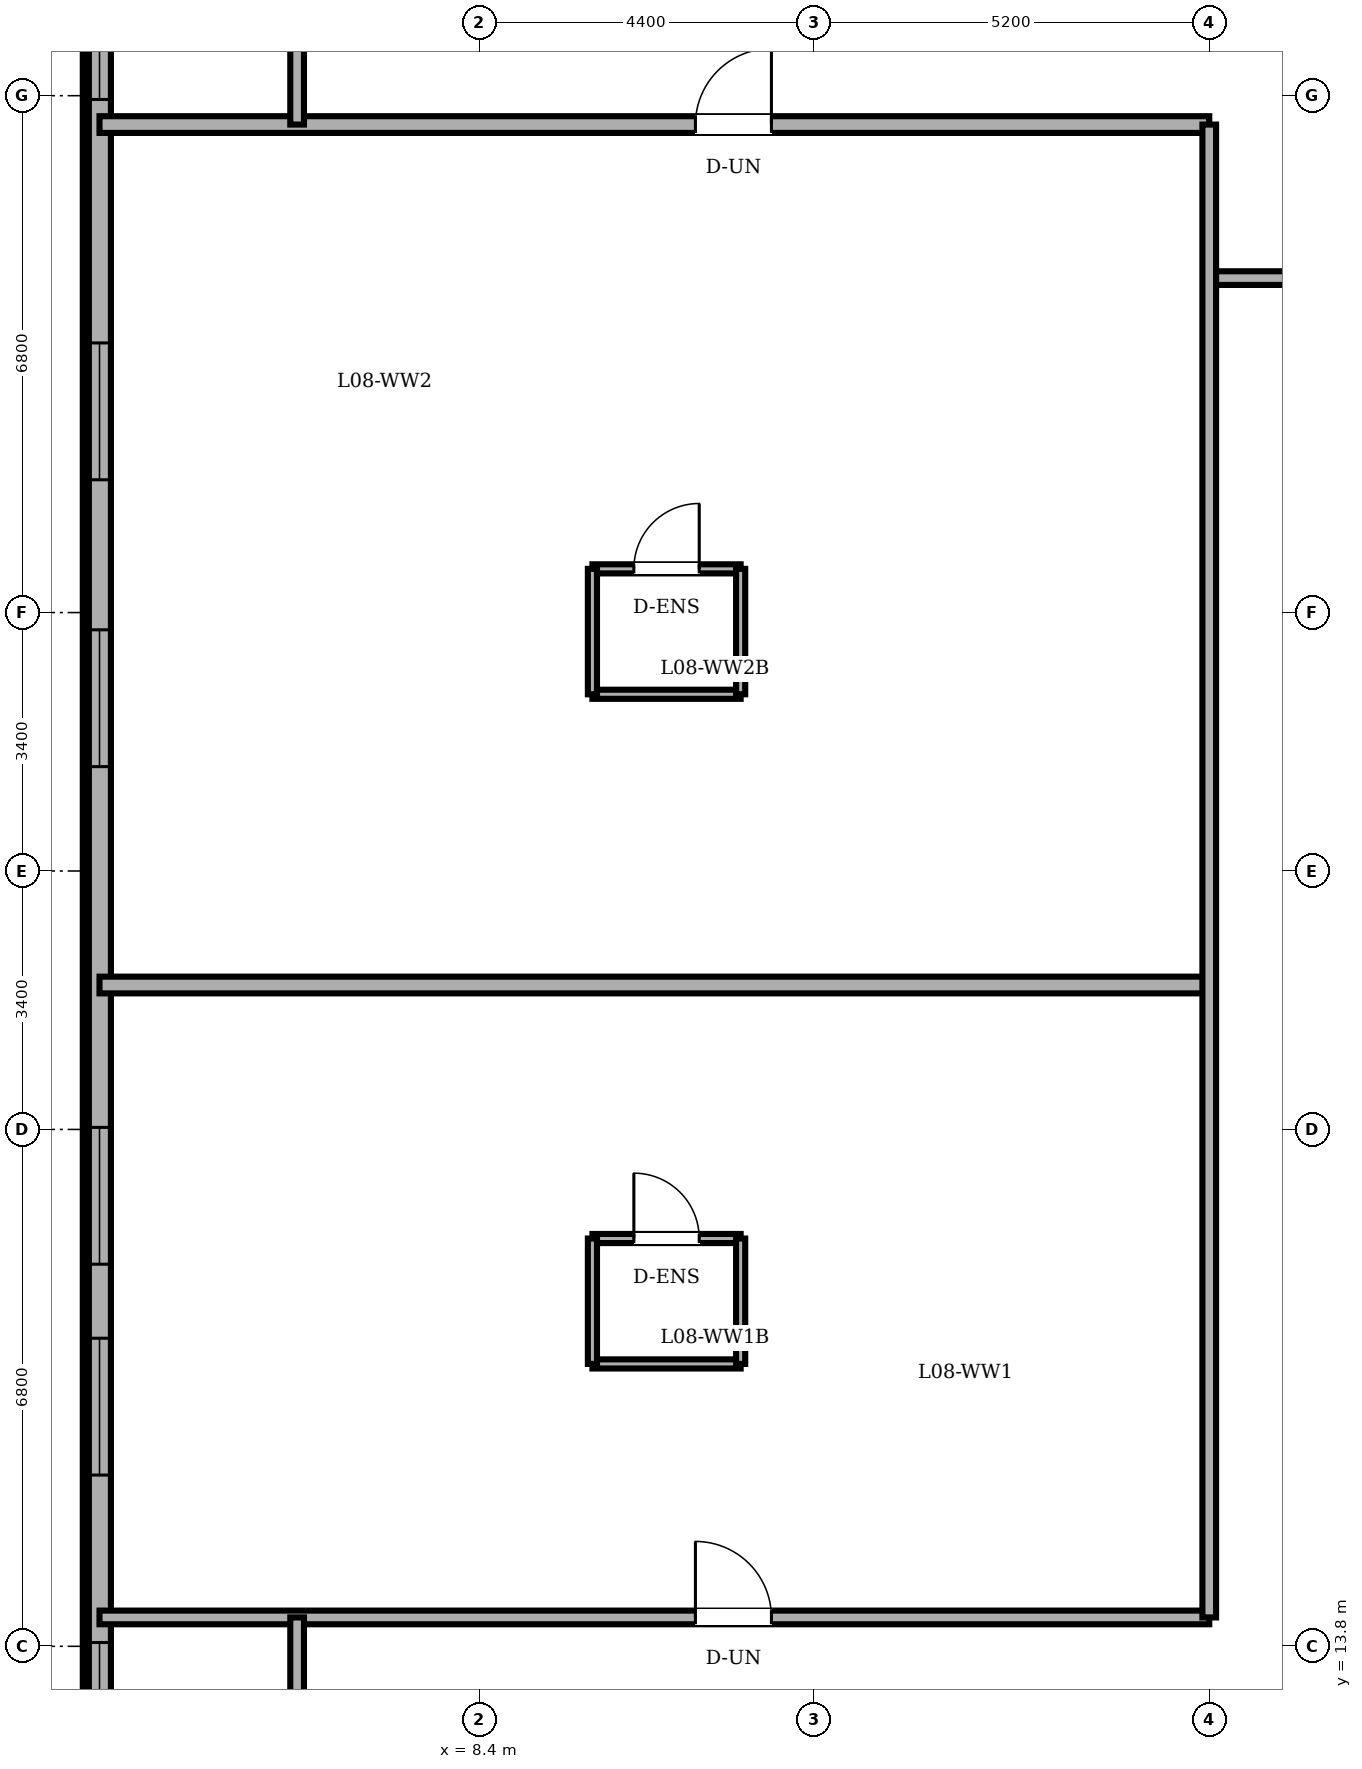
"""IFC4 building model, lengths in metres.
Left out: names, types, materials, properties, quantities, classifications, styles, units other than length and angle.
Written with IfcOpenShell. Run it as: python <this file> out.ifc"""

import sys

from ifc_helpers import new_model, si_unit, direction, frame, frame_2d, origin, place, context, subcontext, project, spatial, rectangle, extrude, element, fill, save


model = new_model("IFC4")
c1 = context("Model", 3, precision=1e-05, world=origin(), true_north=direction((0.0, 1.0)))
c2 = subcontext(c1, "Body", "Model", "MODEL_VIEW")
j1 = project(units=[si_unit("LENGTHUNIT", "METRE"), si_unit("PLANEANGLEUNIT", "RADIAN")], contexts=[c1])
p1 = place(None, origin())
s1 = spatial("IfcSite", under=j1, at=p1, CompositionType="ELEMENT")
p2 = place(p1, origin())
s2 = spatial("IfcBuilding", under=s1, at=p2, CompositionType="ELEMENT")
p3 = place(p2, frame((0.0, 0.0, 32.4)))
s3 = spatial("IfcBuildingStorey", under=s2, at=p3, CompositionType="ELEMENT", Elevation=32.4)
p4 = place(p3, frame((3.4, 40.2, 0.0), z_axis=(0.0, 0.0, 1.0), x_axis=(0.0, -1.0, 0.0)))
e1 = element("IfcWall", 1, at=p4, inside=s3, PredefinedType="SOLIDWALL", context=c2, shape_type="SweptSolid", body=[
    extrude(rectangle(XDim=32.4, YDim=0.3, at=frame_2d((16.2, 0.0))), origin(), (0.0, 0.0, 1.0), 3.4),
])
p5 = place(p4, frame((1.235, 0.0, 0.85)))
e2 = element("IfcOpeningElement", 2, at=p5, cuts=e1, PredefinedType="OPENING", context=c2, shape_type="SweptSolid", body=[
    extrude(rectangle(XDim=1.8, YDim=1.55, at=frame_2d((0.9, 0.775))), frame((0.0, 0.16, 0.0), z_axis=(0.0, -1.0, 0.0), x_axis=(1.0, 0.0, 0.0)), (0.0, 0.0, 1.0), 0.32),
])
p6 = place(p4, frame((4.25, 0.0, 0.85)))
e3 = element("IfcOpeningElement", 3, at=p6, cuts=e1, PredefinedType="OPENING", context=c2, shape_type="SweptSolid", body=[
    extrude(rectangle(XDim=1.8, YDim=1.55, at=frame_2d((0.9, 0.775))), frame((0.0, 0.16, 0.0), z_axis=(0.0, -1.0, 0.0), x_axis=(1.0, 0.0, 0.0)), (0.0, 0.0, 1.0), 0.32),
])
p7 = place(p4, frame((9.253, 0.0, 0.85)))
e4 = element("IfcOpeningElement", 4, at=p7, cuts=e1, PredefinedType="OPENING", context=c2, shape_type="SweptSolid", body=[
    extrude(rectangle(XDim=1.8, YDim=1.55, at=frame_2d((0.9, 0.775))), frame((0.0, 0.16, 0.0), z_axis=(0.0, -1.0, 0.0), x_axis=(1.0, 0.0, 0.0)), (0.0, 0.0, 1.0), 0.32),
])
p8 = place(p4, frame((13.027, 0.0, 0.85)))
e5 = element("IfcOpeningElement", 5, at=p8, cuts=e1, PredefinedType="OPENING", context=c2, shape_type="SweptSolid", body=[
    extrude(rectangle(XDim=1.8, YDim=1.55, at=frame_2d((0.9, 0.775))), frame((0.0, 0.16, 0.0), z_axis=(0.0, -1.0, 0.0), x_axis=(1.0, 0.0, 0.0)), (0.0, 0.0, 1.0), 0.32),
])
p9 = place(p4, frame((19.573, 0.0, 0.85)))
e6 = element("IfcOpeningElement", 6, at=p9, cuts=e1, PredefinedType="OPENING", context=c2, shape_type="SweptSolid", body=[
    extrude(rectangle(XDim=1.8, YDim=1.55, at=frame_2d((0.9, 0.775))), frame((0.0, 0.16, 0.0), z_axis=(0.0, -1.0, 0.0), x_axis=(1.0, 0.0, 0.0)), (0.0, 0.0, 1.0), 0.32),
])
p10 = place(p4, frame((22.347, 0.0, 0.85)))
e7 = element("IfcOpeningElement", 7, at=p10, cuts=e1, PredefinedType="OPENING", context=c2, shape_type="SweptSolid", body=[
    extrude(rectangle(XDim=1.8, YDim=1.55, at=frame_2d((0.9, 0.775))), frame((0.0, 0.16, 0.0), z_axis=(0.0, -1.0, 0.0), x_axis=(1.0, 0.0, 0.0)), (0.0, 0.0, 1.0), 0.32),
])
p11 = place(p4, frame((26.35, 0.0, 0.85)))
e8 = element("IfcOpeningElement", 8, at=p11, cuts=e1, PredefinedType="OPENING", context=c2, shape_type="SweptSolid", body=[
    extrude(rectangle(XDim=1.8, YDim=1.55, at=frame_2d((0.9, 0.775))), frame((0.0, 0.16, 0.0), z_axis=(0.0, -1.0, 0.0), x_axis=(1.0, 0.0, 0.0)), (0.0, 0.0, 1.0), 0.32),
])
p12 = place(p4, frame((29.365, 0.0, 0.85)))
e9 = element("IfcOpeningElement", 9, at=p12, cuts=e1, PredefinedType="OPENING", context=c2, shape_type="SweptSolid", body=[
    extrude(rectangle(XDim=1.8, YDim=1.55, at=frame_2d((0.9, 0.775))), frame((0.0, 0.16, 0.0), z_axis=(0.0, -1.0, 0.0), x_axis=(1.0, 0.0, 0.0)), (0.0, 0.0, 1.0), 0.32),
])
p13 = place(p3, frame((9.885, 19.165, 0.0), z_axis=(0.0, 0.0, 1.0), x_axis=(1.0, 0.0, 0.0)))
e10 = element("IfcWall", 10, at=p13, inside=s3, PredefinedType="PARTITIONING", context=c2, shape_type="SweptSolid", body=[
    extrude(rectangle(XDim=1.95, YDim=0.12, at=frame_2d((0.975, 0.0))), origin(), (0.0, 0.0, 1.0), 3.4),
])
p14 = place(p13, frame((0.545, 0.0, 0.0)))
e11 = element("IfcOpeningElement", 11, at=p14, cuts=e10, PredefinedType="OPENING", context=c2, shape_type="SweptSolid", body=[
    extrude(rectangle(XDim=0.86, YDim=2.1, at=frame_2d((0.43, 1.05))), frame((0.0, 0.07, 0.0), z_axis=(0.0, -1.0, 0.0), x_axis=(1.0, 0.0, 0.0)), (0.0, 0.0, 1.0), 0.14),
])
p15 = place(p3, frame((11.835, 17.515, 0.0), z_axis=(0.0, 0.0, 1.0), x_axis=(-1.0, 0.0, 0.0)))
e12 = element("IfcWall", 12, at=p15, inside=s3, PredefinedType="PARTITIONING", context=c2, shape_type="SweptSolid", body=[
    extrude(rectangle(XDim=1.95, YDim=0.12, at=frame_2d((0.975, 0.0))), origin(), (0.0, 0.0, 1.0), 3.4),
])
for number, where, z_axis, x_axis in (
    (13, (9.885, 19.165, 0.0), (0.0, 0.0, 1.0), (0.0, -1.0, 0.0)),
    (14, (11.835, 17.515, 0.0), (0.0, 0.0, 1.0), (0.0, 1.0, 0.0)),
):
    element("IfcWall", number, at=place(p3, frame(where, z_axis=z_axis, x_axis=x_axis)), inside=s3, PredefinedType="PARTITIONING", context=c2, shape_type="SweptSolid", body=[
        extrude(rectangle(XDim=1.65, YDim=0.12, at=frame_2d((0.825, 0.0))), origin(), (0.0, 0.0, 1.0), 3.4),
    ])
p16 = place(p3, frame((9.885, 27.975, 0.0), z_axis=(0.0, 0.0, 1.0), x_axis=(1.0, 0.0, 0.0)))
e15 = element("IfcWall", 15, at=p16, inside=s3, PredefinedType="PARTITIONING", context=c2, shape_type="SweptSolid", body=[
    extrude(rectangle(XDim=1.95, YDim=0.12, at=frame_2d((0.975, 0.0))), origin(), (0.0, 0.0, 1.0), 3.4),
])
p17 = place(p16, frame((0.545, 0.0, 0.0)))
e16 = element("IfcOpeningElement", 16, at=p17, cuts=e15, PredefinedType="OPENING", context=c2, shape_type="SweptSolid", body=[
    extrude(rectangle(XDim=0.86, YDim=2.1, at=frame_2d((0.43, 1.05))), frame((0.0, 0.07, 0.0), z_axis=(0.0, -1.0, 0.0), x_axis=(1.0, 0.0, 0.0)), (0.0, 0.0, 1.0), 0.14),
])
p18 = place(p3, frame((11.835, 26.325, 0.0), z_axis=(0.0, 0.0, 1.0), x_axis=(-1.0, 0.0, 0.0)))
e17 = element("IfcWall", 17, at=p18, inside=s3, PredefinedType="PARTITIONING", context=c2, shape_type="SweptSolid", body=[
    extrude(rectangle(XDim=1.95, YDim=0.12, at=frame_2d((0.975, 0.0))), origin(), (0.0, 0.0, 1.0), 3.4),
])
for number, where, z_axis, x_axis in (
    (18, (9.885, 27.975, 0.0), (0.0, 0.0, 1.0), (0.0, -1.0, 0.0)),
    (19, (11.835, 26.325, 0.0), (0.0, 0.0, 1.0), (0.0, 1.0, 0.0)),
):
    element("IfcWall", number, at=place(p3, frame(where, z_axis=z_axis, x_axis=x_axis)), inside=s3, PredefinedType="PARTITIONING", context=c2, shape_type="SweptSolid", body=[
        extrude(rectangle(XDim=1.65, YDim=0.12, at=frame_2d((0.825, 0.0))), origin(), (0.0, 0.0, 1.0), 3.4),
    ])
p19 = place(p3, frame((3.4, 14.18, 0.0), z_axis=(0.0, 0.0, 1.0), x_axis=(1.0, 0.0, 0.0)))
e20 = element("IfcWall", 20, at=p19, inside=s3, PredefinedType="PARTITIONING", context=c2, shape_type="SweptSolid", body=[
    extrude(rectangle(XDim=14.6, YDim=0.18, at=frame_2d((7.3, 0.0))), origin(), (0.0, 0.0, 1.0), 3.4),
])
p20 = place(p19, frame((7.84, 0.0, 0.0)))
e21 = element("IfcOpeningElement", 21, at=p20, cuts=e20, PredefinedType="OPENING", context=c2, shape_type="SweptSolid", body=[
    extrude(rectangle(XDim=1.0, YDim=2.15, at=frame_2d((0.5, 1.075))), frame((0.0, 0.1, 0.0), z_axis=(0.0, -1.0, 0.0), x_axis=(1.0, 0.0, 0.0)), (0.0, 0.0, 1.0), 0.2),
])
p21 = place(p3, frame((3.4, 22.5, 0.0), z_axis=(0.0, 0.0, 1.0), x_axis=(1.0, 0.0, 0.0)))
e22 = element("IfcWall", 22, at=p21, inside=s3, PredefinedType="PARTITIONING", context=c2, shape_type="SweptSolid", body=[
    extrude(rectangle(XDim=14.6, YDim=0.22, at=frame_2d((7.3, 0.0))), origin(), (0.0, 0.0, 1.0), 3.4),
])
p22 = place(p3, frame((18.0, 31.8, 0.0), z_axis=(0.0, 0.0, 1.0), x_axis=(1.0, 0.0, 0.0)))
e23 = element("IfcWall", 23, at=p22, inside=s3, PredefinedType="PARTITIONING", context=c2, shape_type="SweptSolid", body=[
    extrude(rectangle(XDim=2.35, YDim=0.18, at=frame_2d((1.175, 0.0))), origin(), (0.0, 0.0, 1.0), 3.4),
])
p23 = place(p3, frame((3.4, 33.82, 0.0), z_axis=(0.0, 0.0, 1.0), x_axis=(1.0, 0.0, 0.0)))
e24 = element("IfcWall", 24, at=p23, inside=s3, PredefinedType="PARTITIONING", context=c2, shape_type="SweptSolid", body=[
    extrude(rectangle(XDim=14.6, YDim=0.22, at=frame_2d((7.3, 0.0))), origin(), (0.0, 0.0, 1.0), 3.4),
])
p24 = place(p23, frame((7.84, 0.0, 0.0)))
e25 = element("IfcOpeningElement", 25, at=p24, cuts=e24, PredefinedType="OPENING", context=c2, shape_type="SweptSolid", body=[
    extrude(rectangle(XDim=1.0, YDim=2.15, at=frame_2d((0.5, 1.075))), frame((0.0, 0.12, 0.0), z_axis=(0.0, -1.0, 0.0), x_axis=(1.0, 0.0, 0.0)), (0.0, 0.0, 1.0), 0.24),
])
for number, where, z_axis, x_axis in (
    (26, (6.0, 11.72, 0.0), (0.0, 0.0, 1.0), (0.0, 1.0, 0.0)),
    (27, (6.0, 33.82, 0.0), (0.0, 0.0, 1.0), (0.0, 1.0, 0.0)),
):
    element("IfcWall", number, at=place(p3, frame(where, z_axis=z_axis, x_axis=x_axis)), inside=s3, PredefinedType="PARTITIONING", context=c2, shape_type="SweptSolid", body=[
        extrude(rectangle(XDim=2.46, YDim=0.18, at=frame_2d((1.23, 0.0))), origin(), (0.0, 0.0, 1.0), 3.4),
    ])
p25 = place(p3, frame((18.0, 14.18, 0.0), z_axis=(0.0, 0.0, 1.0), x_axis=(0.0, 1.0, 0.0)))
e28 = element("IfcWall", 28, at=p25, inside=s3, PredefinedType="PARTITIONING", context=c2, shape_type="SweptSolid", body=[
    extrude(rectangle(XDim=19.64, YDim=0.18, at=frame_2d((9.82, 0.0))), origin(), (0.0, 0.0, 1.0), 3.4),
])
p26 = place(p6, origin())
e29 = element("IfcWindow", 29, at=p26, inside=s3, PartitioningType="DOUBLE_PANEL_VERTICAL", PredefinedType="WINDOW", context=c2, shape_type="SweptSolid", body=[
    extrude(rectangle(XDim=1.8, YDim=1.55, at=frame_2d((0.9, 0.775))), frame((0.0, 0.03, 0.0), z_axis=(0.0, -1.0, 0.0), x_axis=(1.0, 0.0, 0.0)), (0.0, 0.0, 1.0), 0.06),
])
fill(e3, e29)
p27 = place(p7, origin())
e30 = element("IfcWindow", 30, at=p27, inside=s3, PartitioningType="DOUBLE_PANEL_VERTICAL", PredefinedType="WINDOW", context=c2, shape_type="SweptSolid", body=[
    extrude(rectangle(XDim=1.8, YDim=1.55, at=frame_2d((0.9, 0.775))), frame((0.0, 0.03, 0.0), z_axis=(0.0, -1.0, 0.0), x_axis=(1.0, 0.0, 0.0)), (0.0, 0.0, 1.0), 0.06),
])
fill(e4, e30)
p28 = place(p8, origin())
e31 = element("IfcWindow", 31, at=p28, inside=s3, PartitioningType="DOUBLE_PANEL_VERTICAL", PredefinedType="WINDOW", context=c2, shape_type="SweptSolid", body=[
    extrude(rectangle(XDim=1.8, YDim=1.55, at=frame_2d((0.9, 0.775))), frame((0.0, 0.03, 0.0), z_axis=(0.0, -1.0, 0.0), x_axis=(1.0, 0.0, 0.0)), (0.0, 0.0, 1.0), 0.06),
])
fill(e5, e31)
p29 = place(p9, origin())
e32 = element("IfcWindow", 32, at=p29, inside=s3, PartitioningType="DOUBLE_PANEL_VERTICAL", PredefinedType="WINDOW", context=c2, shape_type="SweptSolid", body=[
    extrude(rectangle(XDim=1.8, YDim=1.55, at=frame_2d((0.9, 0.775))), frame((0.0, 0.03, 0.0), z_axis=(0.0, -1.0, 0.0), x_axis=(1.0, 0.0, 0.0)), (0.0, 0.0, 1.0), 0.06),
])
fill(e6, e32)
p30 = place(p10, origin())
e33 = element("IfcWindow", 33, at=p30, inside=s3, PartitioningType="DOUBLE_PANEL_VERTICAL", PredefinedType="WINDOW", context=c2, shape_type="SweptSolid", body=[
    extrude(rectangle(XDim=1.8, YDim=1.55, at=frame_2d((0.9, 0.775))), frame((0.0, 0.03, 0.0), z_axis=(0.0, -1.0, 0.0), x_axis=(1.0, 0.0, 0.0)), (0.0, 0.0, 1.0), 0.06),
])
fill(e7, e33)
p31 = place(p11, origin())
e34 = element("IfcWindow", 34, at=p31, inside=s3, PartitioningType="DOUBLE_PANEL_VERTICAL", PredefinedType="WINDOW", context=c2, shape_type="SweptSolid", body=[
    extrude(rectangle(XDim=1.8, YDim=1.55, at=frame_2d((0.9, 0.775))), frame((0.0, 0.03, 0.0), z_axis=(0.0, -1.0, 0.0), x_axis=(1.0, 0.0, 0.0)), (0.0, 0.0, 1.0), 0.06),
])
fill(e8, e34)
p32 = place(p14, origin())
e35 = element("IfcDoor", 35, at=p32, inside=s3, OperationType="SINGLE_SWING_LEFT", PredefinedType="DOOR", context=c2, shape_type="SweptSolid", body=[
    extrude(rectangle(XDim=0.86, YDim=2.1, at=frame_2d((0.43, 1.05))), frame((0.0, 0.025, 0.0), z_axis=(0.0, -1.0, 0.0), x_axis=(1.0, 0.0, 0.0)), (0.0, 0.0, 1.0), 0.05),
])
fill(e11, e35)
p33 = place(p17, origin())
e36 = element("IfcDoor", 36, at=p33, inside=s3, OperationType="SINGLE_SWING_RIGHT", PredefinedType="DOOR", context=c2, shape_type="SweptSolid", body=[
    extrude(rectangle(XDim=0.86, YDim=2.1, at=frame_2d((0.43, 1.05))), frame((0.0, 0.025, 0.0), z_axis=(0.0, -1.0, 0.0), x_axis=(1.0, 0.0, 0.0)), (0.0, 0.0, 1.0), 0.05),
])
fill(e16, e36)
p34 = place(p20, origin())
e37 = element("IfcDoor", 37, at=p34, inside=s3, OperationType="SINGLE_SWING_LEFT", PredefinedType="DOOR", context=c2, shape_type="SweptSolid", body=[
    extrude(rectangle(XDim=1.0, YDim=2.15, at=frame_2d((0.5, 1.075))), frame((0.0, 0.025, 0.0), z_axis=(0.0, -1.0, 0.0), x_axis=(1.0, 0.0, 0.0)), (0.0, 0.0, 1.0), 0.05),
])
fill(e21, e37)
p35 = place(p24, origin())
e38 = element("IfcDoor", 38, at=p35, inside=s3, OperationType="SINGLE_SWING_RIGHT", PredefinedType="DOOR", context=c2, shape_type="SweptSolid", body=[
    extrude(rectangle(XDim=1.0, YDim=2.15, at=frame_2d((0.5, 1.075))), frame((0.0, 0.025, 0.0), z_axis=(0.0, -1.0, 0.0), x_axis=(1.0, 0.0, 0.0)), (0.0, 0.0, 1.0), 0.05),
])
fill(e25, e38)
save(model, sys.argv[1])
